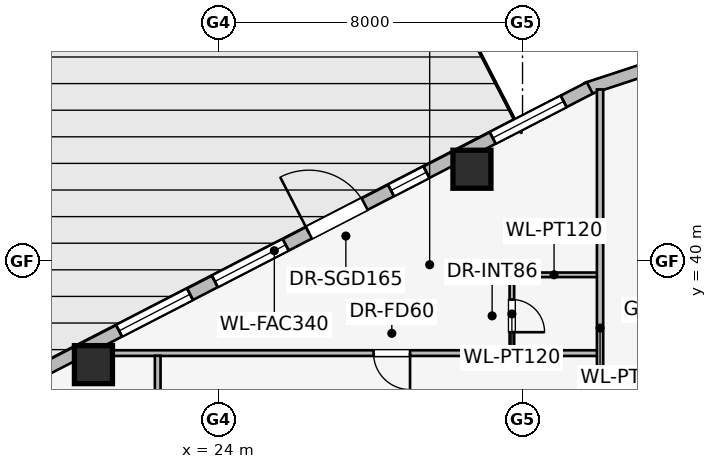
"""IFC4 building model, lengths in metres.
Left out: names, types, materials, properties, quantities, classifications, styles, units other than length and angle.
Written with IfcOpenShell. Run it as: python <this file> out.ifc"""

import sys

from ifc_helpers import new_model, si_unit, direction, frame, frame_2d, origin, origin_2d, place, context, subcontext, project, spatial, rectangle, extrude, element, fill, save


model = new_model("IFC4")
c1 = context("Model", 3, precision=1e-05, world=origin(), true_north=direction((0.0, 1.0)))
c2 = subcontext(c1, "Body", "Model", "MODEL_VIEW")
j1 = project(units=[si_unit("LENGTHUNIT", "METRE"), si_unit("PLANEANGLEUNIT", "RADIAN")], contexts=[c1])
p1 = place(None, origin())
s1 = spatial("IfcSite", under=j1, at=p1, CompositionType="ELEMENT")
p2 = place(p1, origin())
s2 = spatial("IfcBuilding", under=s1, at=p2, CompositionType="ELEMENT")
p3 = place(p2, frame((0.0, 0.0, 149.85)))
s3 = spatial("IfcBuildingStorey", under=s2, at=p3, CompositionType="ELEMENT", Elevation=149.85)
for number, where, z_axis, x_axis in (
    (1, (30.669, 42.418, 0.0), (0.0, 0.0, 1.0), (1.0, 0.0, 0.0)),
    (2, (20.709, 37.277, 0.0), (0.0, 0.0, 1.0), (1.0, 0.0, 0.0)),
):
    element("IfcColumn", number, at=place(p3, frame(where, z_axis=z_axis, x_axis=x_axis)), inside=s3, PredefinedType="COLUMN", context=c2, shape_type="SweptSolid", body=[
        extrude(rectangle(XDim=1.0, YDim=1.0, at=origin_2d()), origin(), (0.0, 0.0, 1.0), 3.45),
    ])
p4 = place(p3, frame((33.681, 44.532, 0.0), z_axis=(0.0, 0.0, 1.0), x_axis=(0.949937416267, 0.312440242569, 0.0)))
e3 = element("IfcWall", 3, at=p4, inside=s3, PredefinedType="STANDARD", context=c2, shape_type="SweptSolid", body=[
    extrude(rectangle(XDim=1.722, YDim=0.33, at=frame_2d((0.861, 0.0))), origin(), (0.0, 0.0, 1.0), 3.19),
])
p5 = place(p3, frame((17.169, 35.99, 0.0), z_axis=(0.0, 0.0, 1.0), x_axis=(0.888613612362, 0.458656568606, 0.0)))
e4 = element("IfcWall", 4, at=p5, inside=s3, PredefinedType="STANDARD", context=c2, shape_type="SweptSolid", body=[
    extrude(rectangle(XDim=18.681, YDim=0.34, at=frame_2d((9.34, 0.0))), origin(), (0.0, 0.0, 1.0), 2.494),
])
p6 = place(p5, frame((10.365, 0.0, 0.0)))
e5 = element("IfcOpeningElement", 5, at=p6, cuts=e4, PredefinedType="OPENING", context=c2, shape_type="SweptSolid", body=[
    extrude(rectangle(XDim=1.65, YDim=2.25, at=frame_2d((0.825, 1.125))), frame((0.0, 0.18, 0.0), z_axis=(0.0, -1.0, 0.0), x_axis=(1.0, 0.0, 0.0)), (0.0, 0.0, 1.0), 0.36),
])
p7 = place(p5, frame((1.298, 0.0, 0.75)))
e6 = element("IfcOpeningElement", 6, at=p7, cuts=e4, PredefinedType="OPENING", context=c2, shape_type="SweptSolid", body=[
    extrude(rectangle(XDim=1.05, YDim=1.4, at=frame_2d((0.525, 0.7))), frame((0.0, 0.18, 0.0), z_axis=(0.0, -1.0, 0.0), x_axis=(1.0, 0.0, 0.0)), (0.0, 0.0, 1.0), 0.36),
])
p8 = place(p5, frame((4.743, 0.0, 0.75)))
e7 = element("IfcOpeningElement", 7, at=p8, cuts=e4, PredefinedType="OPENING", context=c2, shape_type="SweptSolid", body=[
    extrude(rectangle(XDim=2.1, YDim=1.5, at=frame_2d((1.05, 0.75))), frame((0.0, 0.18, 0.0), z_axis=(0.0, -1.0, 0.0), x_axis=(1.0, 0.0, 0.0)), (0.0, 0.0, 1.0), 0.36),
])
p9 = place(p5, frame((7.578, 0.0, 0.75)))
e8 = element("IfcOpeningElement", 8, at=p9, cuts=e4, PredefinedType="OPENING", context=c2, shape_type="SweptSolid", body=[
    extrude(rectangle(XDim=2.1, YDim=1.5, at=frame_2d((1.05, 0.75))), frame((0.0, 0.18, 0.0), z_axis=(0.0, -1.0, 0.0), x_axis=(1.0, 0.0, 0.0)), (0.0, 0.0, 1.0), 0.36),
])
p10 = place(p5, frame((12.795, 0.0, 0.75)))
e9 = element("IfcOpeningElement", 9, at=p10, cuts=e4, PredefinedType="OPENING", context=c2, shape_type="SweptSolid", body=[
    extrude(rectangle(XDim=1.05, YDim=1.4, at=frame_2d((0.525, 0.7))), frame((0.0, 0.18, 0.0), z_axis=(0.0, -1.0, 0.0), x_axis=(1.0, 0.0, 0.0)), (0.0, 0.0, 1.0), 0.36),
])
p11 = place(p5, frame((15.808, 0.0, 0.75)))
e10 = element("IfcOpeningElement", 10, at=p11, cuts=e4, PredefinedType="OPENING", context=c2, shape_type="SweptSolid", body=[
    extrude(rectangle(XDim=2.1, YDim=1.5, at=frame_2d((1.05, 0.75))), frame((0.0, 0.18, 0.0), z_axis=(0.0, -1.0, 0.0), x_axis=(1.0, 0.0, 0.0)), (0.0, 0.0, 1.0), 0.36),
])
p12 = place(p3, frame((34.0, 39.64, 0.0), z_axis=(0.0, 0.0, 1.0), x_axis=(-1.0, 0.0, 0.0)))
e11 = element("IfcWall", 11, at=p12, inside=s3, PredefinedType="PARTITIONING", context=c2, shape_type="SweptSolid", body=[
    extrude(rectangle(XDim=2.34, YDim=0.12, at=frame_2d((1.17, 0.0))), origin(), (0.0, 0.0, 1.0), 3.19),
])
p13 = place(p3, frame((31.72, 39.64, 0.0), z_axis=(0.0, 0.0, 1.0), x_axis=(0.0, -1.0, 0.0)))
e12 = element("IfcWall", 12, at=p13, inside=s3, PredefinedType="PARTITIONING", context=c2, shape_type="SweptSolid", body=[
    extrude(rectangle(XDim=2.06, YDim=0.12, at=frame_2d((1.03, 0.0))), origin(), (0.0, 0.0, 1.0), 3.19),
])
p14 = place(p13, frame((0.65, 0.0, 0.0)))
e13 = element("IfcOpeningElement", 13, at=p14, cuts=e12, PredefinedType="OPENING", context=c2, shape_type="SweptSolid", body=[
    extrude(rectangle(XDim=0.86, YDim=2.0, at=frame_2d((0.43, 1.0))), frame((0.0, 0.07, 0.0), z_axis=(0.0, -1.0, 0.0), x_axis=(1.0, 0.0, 0.0)), (0.0, 0.0, 1.0), 0.14),
])
p15 = place(p3, frame((34.0, 37.58, 0.0), z_axis=(0.0, 0.0, 1.0), x_axis=(-1.0, 0.0, 0.0)))
e14 = element("IfcWall", 14, at=p15, inside=s3, PredefinedType="PARTITIONING", context=c2, shape_type="SweptSolid", body=[
    extrude(rectangle(XDim=13.707, YDim=0.15, at=frame_2d((6.854, 0.0))), origin(), (0.0, 0.0, 1.0), 2.582),
])
p16 = place(p15, frame((4.96, 0.0, 0.0)))
e15 = element("IfcOpeningElement", 15, at=p16, cuts=e14, PredefinedType="OPENING", context=c2, shape_type="SweptSolid", body=[
    extrude(rectangle(XDim=0.96, YDim=2.0, at=frame_2d((0.48, 1.0))), frame((0.0, 0.085, 0.0), z_axis=(0.0, -1.0, 0.0), x_axis=(1.0, 0.0, 0.0)), (0.0, 0.0, 1.0), 0.17),
])
p17 = place(p3, frame((34.04, 31.96, 0.0), z_axis=(0.0, 0.0, 1.0), x_axis=(0.0, 1.0, 0.0)))
e16 = element("IfcWall", 16, at=p17, inside=s3, PredefinedType="PARTITIONING", context=c2, shape_type="SweptSolid", body=[
    extrude(rectangle(XDim=12.558, YDim=0.165, at=frame_2d((6.279, 0.0))), origin(), (0.0, 0.0, 1.0), 3.19),
])
p18 = place(p3, frame((22.4, 36.08, 0.0), z_axis=(0.0, 0.0, 1.0), x_axis=(0.0, 1.0, 0.0)))
e17 = element("IfcWall", 17, at=p18, inside=s3, PredefinedType="PARTITIONING", context=c2, shape_type="SweptSolid", body=[
    extrude(rectangle(XDim=1.43, YDim=0.15, at=frame_2d((0.715, 0.0))), origin(), (0.0, 0.0, 1.0), 3.19),
])
p19 = place(p6, origin())
e18 = element("IfcDoor", 18, at=p19, inside=s3, OperationType="SINGLE_SWING_LEFT", PredefinedType="DOOR", context=c2, shape_type="SweptSolid", body=[
    extrude(rectangle(XDim=1.65, YDim=2.25, at=frame_2d((0.825, 1.125))), frame((0.0, 0.025, 0.0), z_axis=(0.0, -1.0, 0.0), x_axis=(1.0, 0.0, 0.0)), (0.0, 0.0, 1.0), 0.05),
])
fill(e5, e18)
p20 = place(p8, origin())
e19 = element("IfcWindow", 19, at=p20, inside=s3, PartitioningType="SINGLE_PANEL", PredefinedType="WINDOW", context=c2, shape_type="SweptSolid", body=[
    extrude(rectangle(XDim=2.1, YDim=1.5, at=frame_2d((1.05, 0.75))), frame((0.0, 0.03, 0.0), z_axis=(0.0, -1.0, 0.0), x_axis=(1.0, 0.0, 0.0)), (0.0, 0.0, 1.0), 0.06),
])
fill(e7, e19)
p21 = place(p9, origin())
e20 = element("IfcWindow", 20, at=p21, inside=s3, PartitioningType="SINGLE_PANEL", PredefinedType="WINDOW", context=c2, shape_type="SweptSolid", body=[
    extrude(rectangle(XDim=2.1, YDim=1.5, at=frame_2d((1.05, 0.75))), frame((0.0, 0.03, 0.0), z_axis=(0.0, -1.0, 0.0), x_axis=(1.0, 0.0, 0.0)), (0.0, 0.0, 1.0), 0.06),
])
fill(e8, e20)
p22 = place(p10, origin())
e21 = element("IfcWindow", 21, at=p22, inside=s3, PartitioningType="SINGLE_PANEL", PredefinedType="WINDOW", context=c2, shape_type="SweptSolid", body=[
    extrude(rectangle(XDim=1.05, YDim=1.4, at=frame_2d((0.525, 0.7))), frame((0.0, 0.03, 0.0), z_axis=(0.0, -1.0, 0.0), x_axis=(1.0, 0.0, 0.0)), (0.0, 0.0, 1.0), 0.06),
])
fill(e9, e21)
p23 = place(p11, origin())
e22 = element("IfcWindow", 22, at=p23, inside=s3, PartitioningType="SINGLE_PANEL", PredefinedType="WINDOW", context=c2, shape_type="SweptSolid", body=[
    extrude(rectangle(XDim=2.1, YDim=1.5, at=frame_2d((1.05, 0.75))), frame((0.0, 0.03, 0.0), z_axis=(0.0, -1.0, 0.0), x_axis=(1.0, 0.0, 0.0)), (0.0, 0.0, 1.0), 0.06),
])
fill(e10, e22)
p24 = place(p14, origin())
e23 = element("IfcDoor", 23, at=p24, inside=s3, OperationType="SINGLE_SWING_RIGHT", PredefinedType="DOOR", context=c2, shape_type="SweptSolid", body=[
    extrude(rectangle(XDim=0.86, YDim=2.0, at=frame_2d((0.43, 1.0))), frame((0.0, 0.025, 0.0), z_axis=(0.0, -1.0, 0.0), x_axis=(1.0, 0.0, 0.0)), (0.0, 0.0, 1.0), 0.05),
])
fill(e13, e23)
p25 = place(p16, origin())
e24 = element("IfcDoor", 24, at=p25, inside=s3, OperationType="SINGLE_SWING_LEFT", PredefinedType="DOOR", context=c2, shape_type="SweptSolid", body=[
    extrude(rectangle(XDim=0.96, YDim=2.0, at=frame_2d((0.48, 1.0))), frame((0.0, 0.025, 0.0), z_axis=(0.0, -1.0, 0.0), x_axis=(1.0, 0.0, 0.0)), (0.0, 0.0, 1.0), 0.05),
])
fill(e15, e24)
save(model, sys.argv[1])
